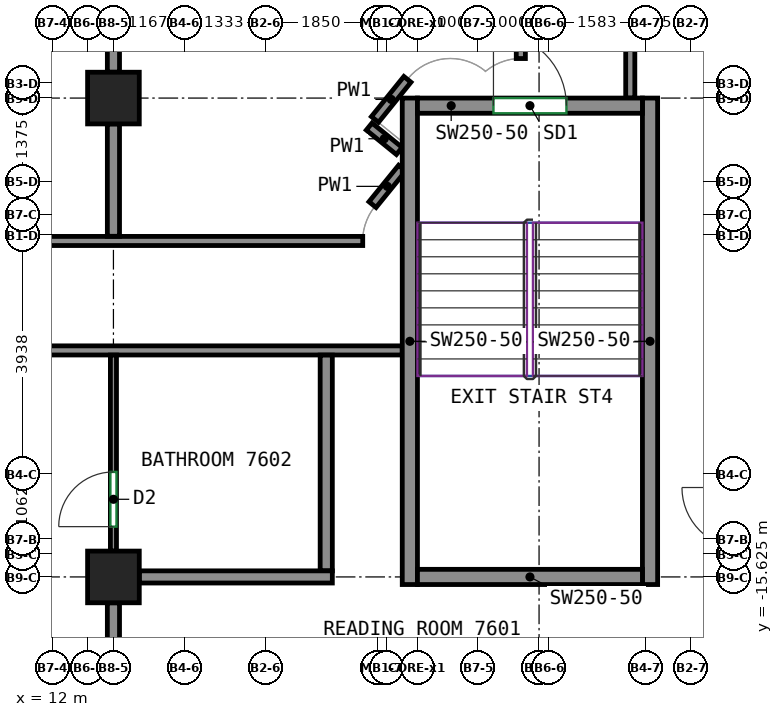
"""IFC4 building model, lengths in metres.
Left out: names, types, materials, properties, quantities, classifications, styles, units other than length and angle.
Written with IfcOpenShell. Run it as: python <this file> out.ifc"""

import sys

from ifc_helpers import new_model, si_unit, direction, frame, frame_2d, origin, origin_2d, place, context, subcontext, project, spatial, rectangle, extrude, source, transform, mapped, element, fill, save


model = new_model("IFC4")
c1 = context("Model", 3, precision=1e-05, world=origin(), true_north=direction((0.0, 1.0)))
c2 = subcontext(c1, "Body", "Model", "MODEL_VIEW")
j1 = project(units=[si_unit("LENGTHUNIT", "METRE"), si_unit("PLANEANGLEUNIT", "RADIAN")], contexts=[c1])
p1 = place(None, origin())
s1 = spatial("IfcSite", under=j1, at=p1, CompositionType="ELEMENT")
p2 = place(p1, origin())
s2 = spatial("IfcBuilding", under=s1, at=p2, CompositionType="ELEMENT")
p3 = place(p2, frame((0.0, 0.0, 305.2)))
s3 = spatial("IfcBuildingStorey", under=s2, at=p3, CompositionType="ELEMENT", Elevation=305.2)
m1 = source(origin(), c2, "Body", "SweptSolid", [
    extrude(rectangle(XDim=0.85, YDim=0.85, at=origin_2d()), origin(), (0.0, 0.0, 1.0), 3.12),
])
for number, where, z_axis, x_axis in (
    (1, (13.0, -15.625, 0.0), (0.0, 0.0, 1.0), (1.0, 0.0, 0.0)),
    (2, (13.0, -7.75, 0.0), (0.0, 0.0, 1.0), (1.0, 0.0, 0.0)),
):
    element("IfcColumn", number, at=place(p3, frame(where, z_axis=z_axis, x_axis=x_axis)), inside=s3, PredefinedType="COLUMN", context=c2, shape_type="MappedRepresentation", body=[
        mapped(m1, transform((0.0, 0.0, 0.0))),
    ])
m2 = source(origin(), c2, "Body", "SweptSolid", [
    extrude(rectangle(XDim=8.0, YDim=0.25, at=frame_2d((4.0, 0.0))), origin(), (0.0, 0.0, 1.0), 3.12),
])
for number, where, z_axis, x_axis in (
    (3, (17.875, -15.75, 0.0), (0.0, 0.0, 1.0), (0.0, 1.0, 0.0)),
    (4, (21.825, -15.75, 0.0), (0.0, 0.0, 1.0), (0.0, 1.0, 0.0)),
):
    element("IfcWall", number, at=place(p3, frame(where, z_axis=z_axis, x_axis=x_axis)), inside=s3, PredefinedType="SHEAR", context=c2, shape_type="MappedRepresentation", body=[
        mapped(m2, transform((0.0, 0.0, 0.0))),
    ])
m3 = source(origin(), c2, "Body", "SweptSolid", [
    extrude(rectangle(XDim=3.7, YDim=0.25, at=frame_2d((1.85, 0.0))), origin(), (0.0, 0.0, 1.0), 3.12),
])
p4 = place(p3, frame((18.0, -15.625, 0.0), z_axis=(0.0, 0.0, 1.0), x_axis=(1.0, 0.0, 0.0)))
e5 = element("IfcWall", 5, at=p4, inside=s3, PredefinedType="SHEAR", context=c2, shape_type="MappedRepresentation", body=[
    mapped(m3, transform((0.0, 0.0, 0.0))),
])
p5 = place(p3, frame((18.0, -7.875, 0.0), z_axis=(0.0, 0.0, 1.0), x_axis=(1.0, 0.0, 0.0)))
e6 = element("IfcWall", 6, at=p5, inside=s3, PredefinedType="SHEAR", context=c2, shape_type="MappedRepresentation", body=[
    mapped(m3, transform((0.0, 0.0, 0.0))),
])
p6 = place(p5, frame((1.25, 0.0, 0.0)))
e7 = element("IfcOpeningElement", 7, at=p6, cuts=e6, PredefinedType="OPENING", context=c2, shape_type="SweptSolid", body=[
    extrude(rectangle(XDim=1.2, YDim=2.1, at=frame_2d((0.6, 1.05))), frame((0.0, 0.135, 0.0), z_axis=(0.0, -1.0, 0.0), x_axis=(1.0, 0.0, 0.0)), (0.0, 0.0, 1.0), 0.27),
])
p7 = place(p3, frame((-4.51, -11.9, 0.0), z_axis=(0.0, 0.0, 1.0), x_axis=(1.0, 0.0, 0.0)))
e8 = element("IfcWall", 8, at=p7, inside=s3, PredefinedType="PARTITIONING", context=c2, shape_type="SweptSolid", body=[
    extrude(rectangle(XDim=22.26, YDim=0.15, at=frame_2d((11.13, 0.0))), origin(), (0.0, 0.0, 1.0), 3.12),
])
p8 = place(p7, frame((0.403, 0.0, 0.0)))
e9 = element("IfcOpeningElement", 9, at=p8, cuts=e8, PredefinedType="OPENING", context=c2, shape_type="SweptSolid", body=[
    extrude(rectangle(XDim=1.0, YDim=2.1, at=frame_2d((0.5, 1.05))), frame((0.0, 0.085, 0.0), z_axis=(0.0, -1.0, 0.0), x_axis=(1.0, 0.0, 0.0)), (0.0, 0.0, 1.0), 0.17),
])
p9 = place(p3, frame((21.5, -7.75, 0.0), z_axis=(0.0, 0.0, 1.0), x_axis=(0.0, 1.0, 0.0)))
e10 = element("IfcWall", 10, at=p9, inside=s3, PredefinedType="PARTITIONING", context=c2, shape_type="SweptSolid", body=[
    extrude(rectangle(XDim=29.66, YDim=0.15, at=frame_2d((14.83, 0.0))), origin(), (0.0, 0.0, 1.0), 3.12),
])
p10 = place(p9, frame((20.142, 0.0, 0.0)))
e11 = element("IfcOpeningElement", 11, at=p10, cuts=e10, PredefinedType="OPENING", context=c2, shape_type="SweptSolid", body=[
    extrude(rectangle(XDim=0.9, YDim=2.1, at=frame_2d((0.45, 1.05))), frame((0.0, 0.085, 0.0), z_axis=(0.0, -1.0, 0.0), x_axis=(1.0, 0.0, 0.0)), (0.0, 0.0, 1.0), 0.17),
])
p11 = place(p3, frame((-13.55, -10.1, 0.0), z_axis=(0.0, 0.0, 1.0), x_axis=(1.0, 0.0, 0.0)))
e12 = element("IfcWall", 12, at=p11, inside=s3, PredefinedType="PARTITIONING", context=c2, shape_type="SweptSolid", body=[
    extrude(rectangle(XDim=30.65, YDim=0.15, at=frame_2d((15.325, 0.0))), origin(), (0.0, 0.0, 1.0), 3.12),
])
p12 = place(p11, frame((6.956, 0.0, 0.0)))
e13 = element("IfcOpeningElement", 13, at=p12, cuts=e12, PredefinedType="OPENING", context=c2, shape_type="SweptSolid", body=[
    extrude(rectangle(XDim=0.9, YDim=2.1, at=frame_2d((0.45, 1.05))), frame((0.0, 0.085, 0.0), z_axis=(0.0, -1.0, 0.0), x_axis=(1.0, 0.0, 0.0)), (0.0, 0.0, 1.0), 0.17),
])
p13 = place(p11, frame((10.643, 0.0, 0.0)))
e14 = element("IfcOpeningElement", 14, at=p13, cuts=e12, PredefinedType="OPENING", context=c2, shape_type="SweptSolid", body=[
    extrude(rectangle(XDim=0.9, YDim=2.1, at=frame_2d((0.45, 1.05))), frame((0.0, 0.085, 0.0), z_axis=(0.0, -1.0, 0.0), x_axis=(1.0, 0.0, 0.0)), (0.0, 0.0, 1.0), 0.17),
])
p14 = place(p11, frame((24.155, 0.0, 0.0)))
e15 = element("IfcOpeningElement", 15, at=p14, cuts=e12, PredefinedType="OPENING", context=c2, shape_type="SweptSolid", body=[
    extrude(rectangle(XDim=0.9, YDim=2.1, at=frame_2d((0.45, 1.05))), frame((0.0, 0.085, 0.0), z_axis=(0.0, -1.0, 0.0), x_axis=(1.0, 0.0, 0.0)), (0.0, 0.0, 1.0), 0.17),
])
p15 = place(p3, frame((17.748, -8.902, 0.0), z_axis=(0.0, 0.0, 1.0), x_axis=(-0.630342797145, -0.776316918589, 0.0)))
e16 = element("IfcWall", 16, at=p15, inside=s3, PredefinedType="PARTITIONING", context=c2, shape_type="SweptSolid", body=[
    extrude(rectangle(XDim=0.773, YDim=0.15, at=frame_2d((0.386, 0.0))), origin(), (0.0, 0.0, 1.0), 3.12),
])
p16 = place(p3, frame((17.206, -8.218, 0.0), z_axis=(0.0, 0.0, 1.0), x_axis=(0.776102288291, -0.630607039376, 0.0)))
e17 = element("IfcWall", 17, at=p16, inside=s3, PredefinedType="PARTITIONING", context=c2, shape_type="SweptSolid", body=[
    extrude(rectangle(XDim=0.638, YDim=0.15, at=frame_2d((0.319, 0.0))), origin(), (0.0, 0.0, 1.0), 3.12),
])
p17 = place(p3, frame((17.835, -7.442, 0.0), z_axis=(0.0, 0.0, 1.0), x_axis=(-0.628859024249, -0.777519342281, 0.0)))
e18 = element("IfcWall", 18, at=p17, inside=s3, PredefinedType="PARTITIONING", context=c2, shape_type="SweptSolid", body=[
    extrude(rectangle(XDim=0.849, YDim=0.15, at=frame_2d((0.425, 0.0))), origin(), (0.0, 0.0, 1.0), 3.12),
])
p18 = place(p3, frame((19.7, -7.1, 0.0), z_axis=(0.0, 0.0, 1.0), x_axis=(0.0, 1.0, 0.0)))
e19 = element("IfcWall", 19, at=p18, inside=s3, PredefinedType="PARTITIONING", context=c2, shape_type="SweptSolid", body=[
    extrude(rectangle(XDim=7.135, YDim=0.15, at=frame_2d((3.567, 0.0))), origin(), (0.0, 0.0, 1.0), 3.12),
])
p19 = place(p18, frame((5.633, 0.0, 0.0)))
e20 = element("IfcOpeningElement", 20, at=p19, cuts=e19, PredefinedType="OPENING", context=c2, shape_type="SweptSolid", body=[
    extrude(rectangle(XDim=0.9, YDim=2.1, at=frame_2d((0.45, 1.05))), frame((0.0, 0.085, 0.0), z_axis=(0.0, -1.0, 0.0), x_axis=(1.0, 0.0, 0.0)), (0.0, 0.0, 1.0), 0.17),
])
p20 = place(p3, frame((13.0, -15.2, 0.0), z_axis=(0.0, 0.0, 1.0), x_axis=(0.0, 1.0, 0.0)))
e21 = element("IfcWall", 21, at=p20, inside=s3, PredefinedType="PARTITIONING", context=c2, shape_type="SweptSolid", body=[
    extrude(rectangle(XDim=3.223, YDim=0.1, at=frame_2d((1.611, 0.0))), origin(), (0.0, 0.0, 1.0), 3.12),
])
p21 = place(p20, frame((0.402, 0.0, 0.0)))
e22 = element("IfcOpeningElement", 22, at=p21, cuts=e21, PredefinedType="OPENING", context=c2, shape_type="SweptSolid", body=[
    extrude(rectangle(XDim=0.9, YDim=2.1, at=frame_2d((0.45, 1.05))), frame((0.0, 0.06, 0.0), z_axis=(0.0, -1.0, 0.0), x_axis=(1.0, 0.0, 0.0)), (0.0, 0.0, 1.0), 0.12),
])
p22 = place(p3, frame((13.0, -22.75, 0.0), z_axis=(0.0, 0.0, 1.0), x_axis=(0.0, 1.0, 0.0)))
e23 = element("IfcWall", 23, at=p22, inside=s3, PredefinedType="PARTITIONING", context=c2, shape_type="SweptSolid", body=[
    extrude(rectangle(XDim=6.7, YDim=0.2, at=frame_2d((3.35, 0.0))), origin(), (0.0, 0.0, 1.0), 3.12),
])
p23 = place(p3, frame((16.5, -15.525, 0.0), z_axis=(0.0, 0.0, 1.0), x_axis=(0.0, 1.0, 0.0)))
e24 = element("IfcWall", 24, at=p23, inside=s3, PredefinedType="PARTITIONING", context=c2, shape_type="SweptSolid", body=[
    extrude(rectangle(XDim=3.548, YDim=0.2, at=frame_2d((1.774, 0.0))), origin(), (0.0, 0.0, 1.0), 3.12),
])
p24 = place(p3, frame((13.425, -15.625, 0.0), z_axis=(0.0, 0.0, 1.0), x_axis=(1.0, 0.0, 0.0)))
e25 = element("IfcWall", 25, at=p24, inside=s3, PredefinedType="PARTITIONING", context=c2, shape_type="SweptSolid", body=[
    extrude(rectangle(XDim=3.175, YDim=0.2, at=frame_2d((1.587, 0.0))), origin(), (0.0, 0.0, 1.0), 3.12),
])
p25 = place(p3, frame((13.0, -7.325, 0.0), z_axis=(0.0, 0.0, 1.0), x_axis=(0.0, 1.0, 0.0)))
e26 = element("IfcWall", 26, at=p25, inside=s3, PredefinedType="PARTITIONING", context=c2, shape_type="SweptSolid", body=[
    extrude(rectangle(XDim=3.413, YDim=0.2, at=frame_2d((1.707, 0.0))), origin(), (0.0, 0.0, 1.0), 3.12),
])
p26 = place(p3, frame((13.0, -10.023, 0.0), z_axis=(0.0, 0.0, 1.0), x_axis=(0.0, 1.0, 0.0)))
e27 = element("IfcWall", 27, at=p26, inside=s3, PredefinedType="PARTITIONING", context=c2, shape_type="SweptSolid", body=[
    extrude(rectangle(XDim=1.848, YDim=0.2, at=frame_2d((0.924, 0.0))), origin(), (0.0, 0.0, 1.0), 3.12),
])
p27 = place(p6, origin())
e28 = element("IfcDoor", 28, at=p27, inside=s3, OperationType="DOUBLE_DOOR_SINGLE_SWING", PredefinedType="DOOR", context=c2, shape_type="SweptSolid", body=[
    extrude(rectangle(XDim=1.2, YDim=2.1, at=frame_2d((0.6, 1.05))), frame((0.0, 0.025, 0.0), z_axis=(0.0, -1.0, 0.0), x_axis=(1.0, 0.0, 0.0)), (0.0, 0.0, 1.0), 0.05),
])
fill(e7, e28)
p28 = place(p21, origin())
e29 = element("IfcDoor", 29, at=p28, inside=s3, OperationType="SINGLE_SWING_LEFT", PredefinedType="DOOR", context=c2, shape_type="SweptSolid", body=[
    extrude(rectangle(XDim=0.9, YDim=2.1, at=frame_2d((0.45, 1.05))), frame((0.0, 0.025, 0.0), z_axis=(0.0, -1.0, 0.0), x_axis=(1.0, 0.0, 0.0)), (0.0, 0.0, 1.0), 0.05),
])
fill(e22, e29)
save(model, sys.argv[1])
